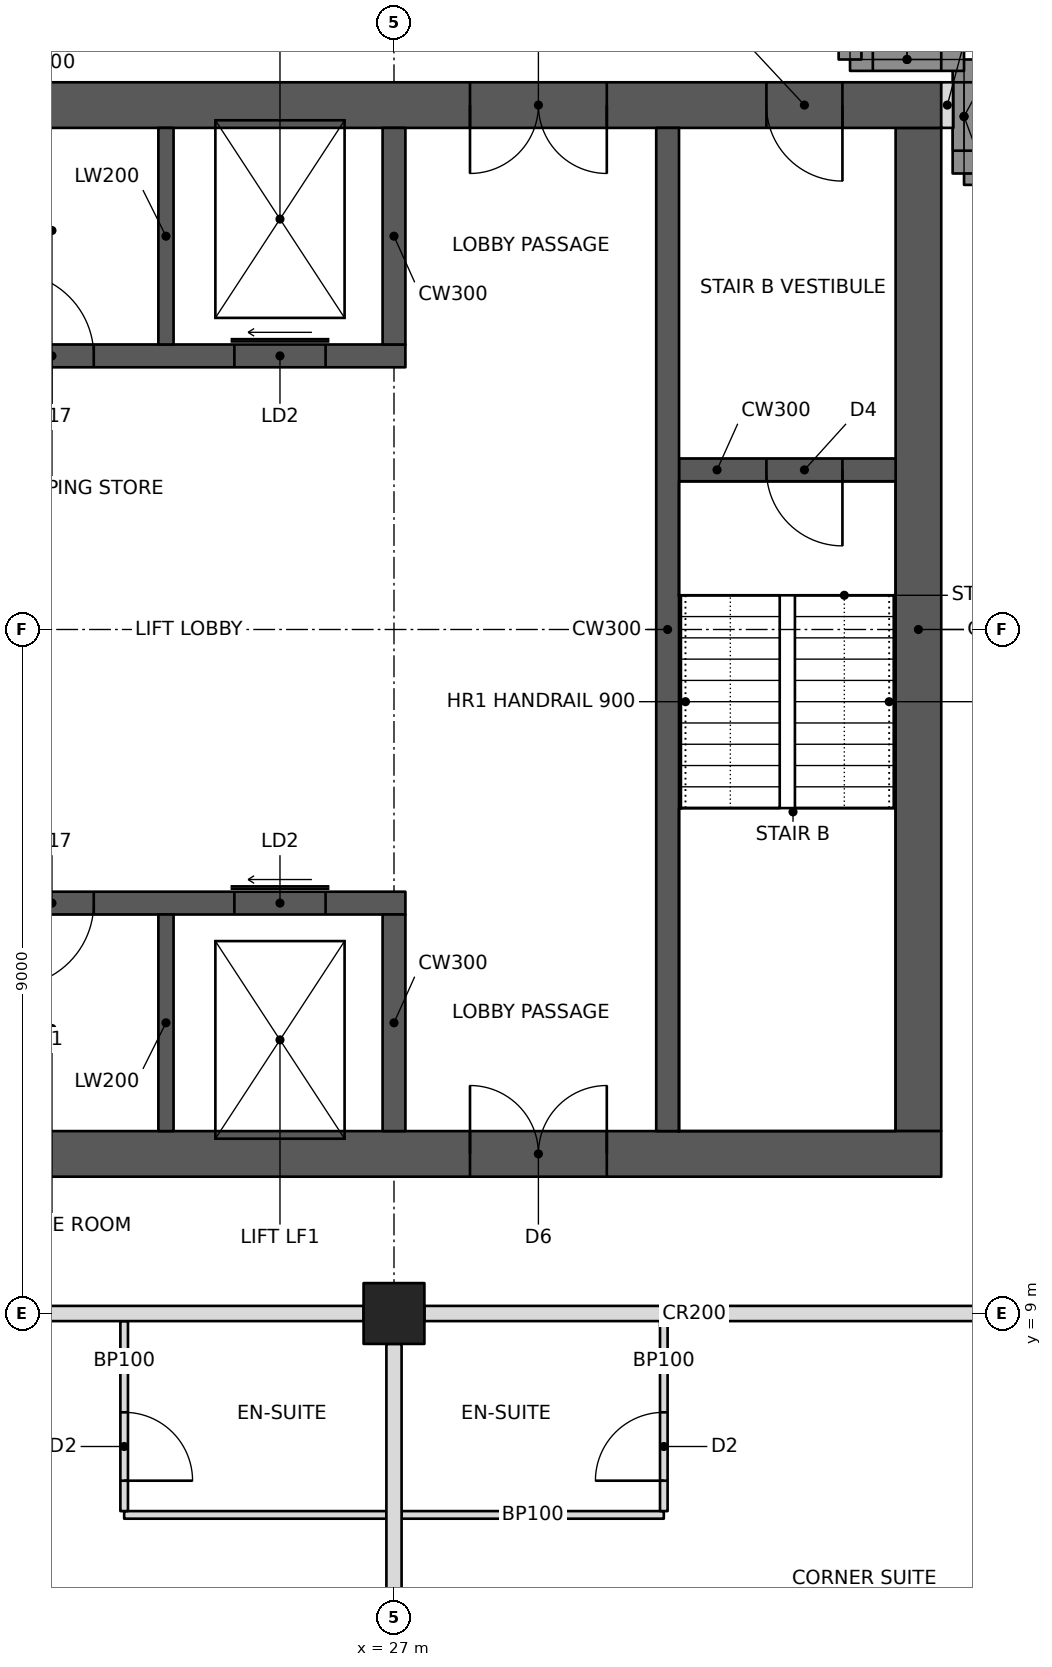
"""IFC4 building model, lengths in metres.
Left out: names, types, materials, properties, quantities, classifications, styles, units other than length and angle.
Written with IfcOpenShell. Run it as: python <this file> out.ifc"""

import sys

from ifc_helpers import new_model, si_unit, direction, frame, frame_2d, origin, origin_2d, place, context, subcontext, project, spatial, rectangle, hollow_rectangle, extrude, element, fill, save


model = new_model("IFC4")
c1 = context("Model", 3, precision=1e-05, world=origin(), true_north=direction((0.0, 1.0)))
c2 = subcontext(c1, "Body", "Model", "MODEL_VIEW")
j1 = project(units=[si_unit("LENGTHUNIT", "METRE"), si_unit("PLANEANGLEUNIT", "RADIAN")], contexts=[c1])
p1 = place(None, origin())
s1 = spatial("IfcSite", under=j1, at=p1, CompositionType="ELEMENT")
p2 = place(p1, origin())
s2 = spatial("IfcBuilding", under=s1, at=p2, CompositionType="ELEMENT")
p3 = place(p2, frame((0.0, 0.0, 244.6)))
s3 = spatial("IfcBuildingStorey", under=s2, at=p3, CompositionType="ELEMENT", Elevation=244.6)
p4 = place(p3, frame((27.0, 9.0, 0.0), z_axis=(0.0, 0.0, 1.0), x_axis=(1.0, 0.0, 0.0)))
e1 = element("IfcColumn", 1, at=p4, inside=s3, PredefinedType="COLUMN", context=c2, shape_type="SweptSolid", body=[
    extrude(hollow_rectangle(XDim=0.8, YDim=0.8, WallThickness=0.04, at=origin_2d()), origin(), (0.0, 0.0, 1.0), 3.6),
])
p5 = place(p3, frame((10.8, 11.1, 0.0), z_axis=(0.0, 0.0, 1.0), x_axis=(1.0, 0.0, 0.0)))
e2 = element("IfcWall", 2, at=p5, inside=s3, PredefinedType="SHEAR", context=c2, shape_type="SweptSolid", body=[
    extrude(rectangle(XDim=23.4, YDim=0.6, at=frame_2d((11.7, 0.0))), origin(), (0.0, 0.0, 1.0), 3.6),
])
p6 = place(p5, frame((1.0, 0.0, 0.0)))
e3 = element("IfcOpeningElement", 3, at=p6, cuts=e2, PredefinedType="OPENING", context=c2, shape_type="SweptSolid", body=[
    extrude(rectangle(XDim=1.0, YDim=2.1, at=frame_2d((0.5, 1.05))), frame((0.0, 0.31, 0.0), z_axis=(0.0, -1.0, 0.0), x_axis=(1.0, 0.0, 0.0)), (0.0, 0.0, 1.0), 0.62),
])
p7 = place(p5, frame((17.2, 0.0, 0.0)))
e4 = element("IfcOpeningElement", 4, at=p7, cuts=e2, PredefinedType="OPENING", context=c2, shape_type="SweptSolid", body=[
    extrude(rectangle(XDim=1.8, YDim=2.1, at=frame_2d((0.9, 1.05))), frame((0.0, 0.31, 0.0), z_axis=(0.0, -1.0, 0.0), x_axis=(1.0, 0.0, 0.0)), (0.0, 0.0, 1.0), 0.62),
])
p8 = place(p3, frame((10.8, 24.9, 0.0), z_axis=(0.0, 0.0, 1.0), x_axis=(1.0, 0.0, 0.0)))
e5 = element("IfcWall", 5, at=p8, inside=s3, PredefinedType="SHEAR", context=c2, shape_type="SweptSolid", body=[
    extrude(rectangle(XDim=23.4, YDim=0.6, at=frame_2d((11.7, 0.0))), origin(), (0.0, 0.0, 1.0), 3.6),
])
p9 = place(p8, frame((17.2, 0.0, 0.0)))
e6 = element("IfcOpeningElement", 6, at=p9, cuts=e5, PredefinedType="OPENING", context=c2, shape_type="SweptSolid", body=[
    extrude(rectangle(XDim=1.8, YDim=2.1, at=frame_2d((0.9, 1.05))), frame((0.0, 0.31, 0.0), z_axis=(0.0, -1.0, 0.0), x_axis=(1.0, 0.0, 0.0)), (0.0, 0.0, 1.0), 0.62),
])
p10 = place(p8, frame((21.1, 0.0, 0.0)))
e7 = element("IfcOpeningElement", 7, at=p10, cuts=e5, PredefinedType="OPENING", context=c2, shape_type="SweptSolid", body=[
    extrude(rectangle(XDim=1.0, YDim=2.1, at=frame_2d((0.5, 1.05))), frame((0.0, 0.31, 0.0), z_axis=(0.0, -1.0, 0.0), x_axis=(1.0, 0.0, 0.0)), (0.0, 0.0, 1.0), 0.62),
])
p11 = place(p8, frame((4.9, 0.0, 0.0)))
e8 = element("IfcOpeningElement", 8, at=p11, cuts=e5, PredefinedType="OPENING", context=c2, shape_type="SweptSolid", body=[
    extrude(rectangle(XDim=1.0, YDim=2.1, at=frame_2d((0.5, 1.05))), frame((0.0, 0.31, 0.0), z_axis=(0.0, -1.0, 0.0), x_axis=(1.0, 0.0, 0.0)), (0.0, 0.0, 1.0), 0.62),
])
p12 = place(p3, frame((33.9, 11.4, 0.0), z_axis=(0.0, 0.0, 1.0), x_axis=(0.0, 1.0, 0.0)))
e9 = element("IfcWall", 9, at=p12, inside=s3, PredefinedType="SHEAR", context=c2, shape_type="SweptSolid", body=[
    extrude(rectangle(XDim=13.2, YDim=0.6, at=frame_2d((6.6, 0.0))), origin(), (0.0, 0.0, 1.0), 3.6),
])
p13 = place(p3, frame((18.15, 14.4, 0.0), z_axis=(0.0, 0.0, 1.0), x_axis=(1.0, 0.0, 0.0)))
e10 = element("IfcWall", 10, at=p13, inside=s3, PredefinedType="SHEAR", context=c2, shape_type="SweptSolid", body=[
    extrude(rectangle(XDim=9.0, YDim=0.3, at=frame_2d((4.5, 0.0))), origin(), (0.0, 0.0, 1.0), 3.6),
])
p14 = place(p13, frame((0.8, 0.0, 0.0)))
e11 = element("IfcOpeningElement", 11, at=p14, cuts=e10, PredefinedType="OPENING", context=c2, shape_type="SweptSolid", body=[
    extrude(rectangle(XDim=1.1, YDim=2.1, at=frame_2d((0.55, 1.05))), frame((0.0, 0.16, 0.0), z_axis=(0.0, -1.0, 0.0), x_axis=(1.0, 0.0, 0.0)), (0.0, 0.0, 1.0), 0.32),
])
p15 = place(p13, frame((6.75, 0.0, 0.0)))
e12 = element("IfcOpeningElement", 12, at=p15, cuts=e10, PredefinedType="OPENING", context=c2, shape_type="SweptSolid", body=[
    extrude(rectangle(XDim=1.2, YDim=2.1, at=frame_2d((0.6, 1.05))), frame((0.0, 0.16, 0.0), z_axis=(0.0, -1.0, 0.0), x_axis=(1.0, 0.0, 0.0)), (0.0, 0.0, 1.0), 0.32),
])
p16 = place(p13, frame((3.8, 0.0, 0.0)))
e13 = element("IfcOpeningElement", 13, at=p16, cuts=e10, PredefinedType="OPENING", context=c2, shape_type="SweptSolid", body=[
    extrude(rectangle(XDim=1.1, YDim=2.1, at=frame_2d((0.55, 1.05))), frame((0.0, 0.16, 0.0), z_axis=(0.0, -1.0, 0.0), x_axis=(1.0, 0.0, 0.0)), (0.0, 0.0, 1.0), 0.32),
])
p17 = place(p3, frame((27.0, 11.4, 0.0), z_axis=(0.0, 0.0, 1.0), x_axis=(0.0, 1.0, 0.0)))
e14 = element("IfcWall", 14, at=p17, inside=s3, PredefinedType="SHEAR", context=c2, shape_type="SweptSolid", body=[
    extrude(rectangle(XDim=2.85, YDim=0.3, at=frame_2d((1.425, 0.0))), origin(), (0.0, 0.0, 1.0), 3.6),
])
p18 = place(p3, frame((24.0, 11.4, 0.0), z_axis=(0.0, 0.0, 1.0), x_axis=(0.0, 1.0, 0.0)))
e15 = element("IfcWall", 15, at=p18, inside=s3, PredefinedType="SHEAR", context=c2, shape_type="SweptSolid", body=[
    extrude(rectangle(XDim=2.85, YDim=0.2, at=frame_2d((1.425, 0.0))), origin(), (0.0, 0.0, 1.0), 3.6),
])
p19 = place(p3, frame((18.15, 21.6, 0.0), z_axis=(0.0, 0.0, 1.0), x_axis=(1.0, 0.0, 0.0)))
e16 = element("IfcWall", 16, at=p19, inside=s3, PredefinedType="SHEAR", context=c2, shape_type="SweptSolid", body=[
    extrude(rectangle(XDim=9.0, YDim=0.3, at=frame_2d((4.5, 0.0))), origin(), (0.0, 0.0, 1.0), 3.6),
])
p20 = place(p19, frame((6.75, 0.0, 0.0)))
e17 = element("IfcOpeningElement", 17, at=p20, cuts=e16, PredefinedType="OPENING", context=c2, shape_type="SweptSolid", body=[
    extrude(rectangle(XDim=1.2, YDim=2.1, at=frame_2d((0.6, 1.05))), frame((0.0, 0.16, 0.0), z_axis=(0.0, -1.0, 0.0), x_axis=(1.0, 0.0, 0.0)), (0.0, 0.0, 1.0), 0.32),
])
p21 = place(p19, frame((0.8, 0.0, 0.0)))
e18 = element("IfcOpeningElement", 18, at=p21, cuts=e16, PredefinedType="OPENING", context=c2, shape_type="SweptSolid", body=[
    extrude(rectangle(XDim=1.1, YDim=2.1, at=frame_2d((0.55, 1.05))), frame((0.0, 0.16, 0.0), z_axis=(0.0, -1.0, 0.0), x_axis=(1.0, 0.0, 0.0)), (0.0, 0.0, 1.0), 0.32),
])
p22 = place(p19, frame((3.8, 0.0, 0.0)))
e19 = element("IfcOpeningElement", 19, at=p22, cuts=e16, PredefinedType="OPENING", context=c2, shape_type="SweptSolid", body=[
    extrude(rectangle(XDim=1.1, YDim=2.1, at=frame_2d((0.55, 1.05))), frame((0.0, 0.16, 0.0), z_axis=(0.0, -1.0, 0.0), x_axis=(1.0, 0.0, 0.0)), (0.0, 0.0, 1.0), 0.32),
])
p23 = place(p3, frame((27.0, 21.75, 0.0), z_axis=(0.0, 0.0, 1.0), x_axis=(0.0, 1.0, 0.0)))
e20 = element("IfcWall", 20, at=p23, inside=s3, PredefinedType="SHEAR", context=c2, shape_type="SweptSolid", body=[
    extrude(rectangle(XDim=2.85, YDim=0.3, at=frame_2d((1.425, 0.0))), origin(), (0.0, 0.0, 1.0), 3.6),
])
p24 = place(p3, frame((24.0, 21.75, 0.0), z_axis=(0.0, 0.0, 1.0), x_axis=(0.0, 1.0, 0.0)))
e21 = element("IfcWall", 21, at=p24, inside=s3, PredefinedType="SHEAR", context=c2, shape_type="SweptSolid", body=[
    extrude(rectangle(XDim=2.85, YDim=0.2, at=frame_2d((1.425, 0.0))), origin(), (0.0, 0.0, 1.0), 3.6),
])
p25 = place(p3, frame((30.6, 11.4, 0.0), z_axis=(0.0, 0.0, 1.0), x_axis=(0.0, 1.0, 0.0)))
e22 = element("IfcWall", 22, at=p25, inside=s3, PredefinedType="SHEAR", context=c2, shape_type="SweptSolid", body=[
    extrude(rectangle(XDim=13.2, YDim=0.3, at=frame_2d((6.6, 0.0))), origin(), (0.0, 0.0, 1.0), 3.6),
])
p26 = place(p3, frame((30.75, 20.1, 0.0), z_axis=(0.0, 0.0, 1.0), x_axis=(1.0, 0.0, 0.0)))
e23 = element("IfcWall", 23, at=p26, inside=s3, PredefinedType="SHEAR", context=c2, shape_type="SweptSolid", body=[
    extrude(rectangle(XDim=2.85, YDim=0.3, at=frame_2d((1.425, 0.0))), origin(), (0.0, 0.0, 1.0), 3.6),
])
p27 = place(p26, frame((1.15, 0.0, 0.0)))
e24 = element("IfcOpeningElement", 24, at=p27, cuts=e23, PredefinedType="OPENING", context=c2, shape_type="SweptSolid", body=[
    extrude(rectangle(XDim=1.0, YDim=2.1, at=frame_2d((0.5, 1.05))), frame((0.0, 0.16, 0.0), z_axis=(0.0, -1.0, 0.0), x_axis=(1.0, 0.0, 0.0)), (0.0, 0.0, 1.0), 0.32),
])
p28 = place(p3, frame((36.0, 24.0, 0.0), z_axis=(0.0, 0.0, 1.0), x_axis=(-1.0, 0.0, 0.0)))
e25 = element("IfcWall", 25, at=p28, inside=s3, PredefinedType="SOLIDWALL", context=c2, shape_type="SweptSolid", body=[
    extrude(rectangle(XDim=1.5, YDim=0.3, at=frame_2d((0.75, 0.0))), origin(), (0.0, 0.0, 1.0), 2.62),
])
p29 = place(p3, frame((34.5, 24.0, 0.0), z_axis=(0.0, 0.0, 1.0), x_axis=(0.0, 1.0, 0.0)))
e26 = element("IfcWall", 26, at=p29, inside=s3, PredefinedType="SOLIDWALL", context=c2, shape_type="SweptSolid", body=[
    extrude(rectangle(XDim=1.5, YDim=0.3, at=frame_2d((0.75, 0.0))), origin(), (0.0, 0.0, 1.0), 3.4),
])
p30 = place(p29, frame((0.3, 0.0, 0.6)))
e27 = element("IfcOpeningElement", 27, at=p30, cuts=e26, PredefinedType="OPENING", context=c2, shape_type="SweptSolid", body=[
    extrude(rectangle(XDim=0.9, YDim=2.2, at=frame_2d((0.45, 1.1))), frame((0.0, 0.16, 0.0), z_axis=(0.0, -1.0, 0.0), x_axis=(1.0, 0.0, 0.0)), (0.0, 0.0, 1.0), 0.32),
])
p31 = place(p3, frame((34.5, 25.5, 0.0), z_axis=(0.0, 0.0, 1.0), x_axis=(-1.0, 0.0, 0.0)))
e28 = element("IfcWall", 28, at=p31, inside=s3, PredefinedType="SOLIDWALL", context=c2, shape_type="SweptSolid", body=[
    extrude(rectangle(XDim=1.5, YDim=0.3, at=frame_2d((0.75, 0.0))), origin(), (0.0, 0.0, 1.0), 3.4),
])
p32 = place(p31, frame((0.3, 0.0, 0.6)))
e29 = element("IfcOpeningElement", 29, at=p32, cuts=e28, PredefinedType="OPENING", context=c2, shape_type="SweptSolid", body=[
    extrude(rectangle(XDim=0.9, YDim=2.2, at=frame_2d((0.45, 1.1))), frame((0.0, 0.16, 0.0), z_axis=(0.0, -1.0, 0.0), x_axis=(1.0, 0.0, 0.0)), (0.0, 0.0, 1.0), 0.32),
])
p33 = place(p3, frame((33.0, 25.5, 0.0), z_axis=(0.0, 0.0, 1.0), x_axis=(0.0, 1.0, 0.0)))
e30 = element("IfcWall", 30, at=p33, inside=s3, PredefinedType="SOLIDWALL", context=c2, shape_type="SweptSolid", body=[
    extrude(rectangle(XDim=1.5, YDim=0.3, at=frame_2d((0.75, 0.0))), origin(), (0.0, 0.0, 1.0), 2.62),
])
p34 = place(p3, frame((18.4, 9.0, 0.0), z_axis=(0.0, 0.0, 1.0), x_axis=(1.0, 0.0, 0.0)))
e31 = element("IfcWall", 31, at=p34, inside=s3, PredefinedType="PARTITIONING", context=c2, shape_type="SweptSolid", body=[
    extrude(rectangle(XDim=8.2, YDim=0.2, at=frame_2d((4.1, 0.0))), origin(), (0.0, 0.0, 1.0), 2.605),
])
p35 = place(p34, frame((0.15, 0.0, 0.0)))
e32 = element("IfcOpeningElement", 32, at=p35, cuts=e31, PredefinedType="OPENING", context=c2, shape_type="SweptSolid", body=[
    extrude(rectangle(XDim=0.9, YDim=2.1, at=frame_2d((0.45, 1.05))), frame((0.0, 0.11, 0.0), z_axis=(0.0, -1.0, 0.0), x_axis=(1.0, 0.0, 0.0)), (0.0, 0.0, 1.0), 0.22),
])
p36 = place(p3, frame((27.4, 9.0, 0.0), z_axis=(0.0, 0.0, 1.0), x_axis=(1.0, 0.0, 0.0)))
e33 = element("IfcWall", 33, at=p36, inside=s3, PredefinedType="PARTITIONING", context=c2, shape_type="SweptSolid", body=[
    extrude(rectangle(XDim=8.368, YDim=0.2, at=frame_2d((4.184, 0.0))), origin(), (0.0, 0.0, 1.0), 2.605),
])
p37 = place(p36, frame((7.25, 0.0, 0.0)))
e34 = element("IfcOpeningElement", 34, at=p37, cuts=e33, PredefinedType="OPENING", context=c2, shape_type="SweptSolid", body=[
    extrude(rectangle(XDim=0.9, YDim=2.1, at=frame_2d((0.45, 1.05))), frame((0.0, 0.11, 0.0), z_axis=(0.0, -1.0, 0.0), x_axis=(1.0, 0.0, 0.0)), (0.0, 0.0, 1.0), 0.22),
])
p38 = place(p3, frame((27.0, 8.6, 0.0), z_axis=(0.0, 0.0, 1.0), x_axis=(0.0, -1.0, 0.0)))
e35 = element("IfcWall", 35, at=p38, inside=s3, PredefinedType="PARTITIONING", context=c2, shape_type="SweptSolid", body=[
    extrude(rectangle(XDim=7.6, YDim=0.2, at=frame_2d((3.8, 0.0))), origin(), (0.0, 0.0, 1.0), 2.605),
])
p39 = place(p3, frame((23.45, 6.35, 0.0), z_axis=(0.0, 0.0, 1.0), x_axis=(1.0, 0.0, 0.0)))
e36 = element("IfcWall", 36, at=p39, inside=s3, PredefinedType="PARTITIONING", context=c2, shape_type="SweptSolid", body=[
    extrude(rectangle(XDim=3.45, YDim=0.1, at=frame_2d((1.725, 0.0))), origin(), (0.0, 0.0, 1.0), 2.604),
])
p40 = place(p3, frame((23.45, 8.9, 0.0), z_axis=(0.0, 0.0, 1.0), x_axis=(0.0, -1.0, 0.0)))
e37 = element("IfcWall", 37, at=p40, inside=s3, PredefinedType="PARTITIONING", context=c2, shape_type="SweptSolid", body=[
    extrude(rectangle(XDim=2.5, YDim=0.1, at=frame_2d((1.25, 0.0))), origin(), (0.0, 0.0, 1.0), 2.604),
])
p41 = place(p40, frame((1.2, 0.0, 0.0)))
e38 = element("IfcOpeningElement", 38, at=p41, cuts=e37, PredefinedType="OPENING", context=c2, shape_type="SweptSolid", body=[
    extrude(rectangle(XDim=0.9, YDim=2.1, at=frame_2d((0.45, 1.05))), frame((0.0, 0.06, 0.0), z_axis=(0.0, -1.0, 0.0), x_axis=(1.0, 0.0, 0.0)), (0.0, 0.0, 1.0), 0.12),
])
p42 = place(p3, frame((27.1, 6.35, 0.0), z_axis=(0.0, 0.0, 1.0), x_axis=(1.0, 0.0, 0.0)))
e39 = element("IfcWall", 39, at=p42, inside=s3, PredefinedType="PARTITIONING", context=c2, shape_type="SweptSolid", body=[
    extrude(rectangle(XDim=3.45, YDim=0.1, at=frame_2d((1.725, 0.0))), origin(), (0.0, 0.0, 1.0), 2.604),
])
p43 = place(p3, frame((30.55, 8.9, 0.0), z_axis=(0.0, 0.0, 1.0), x_axis=(0.0, -1.0, 0.0)))
e40 = element("IfcWall", 40, at=p43, inside=s3, PredefinedType="PARTITIONING", context=c2, shape_type="SweptSolid", body=[
    extrude(rectangle(XDim=2.5, YDim=0.1, at=frame_2d((1.25, 0.0))), origin(), (0.0, 0.0, 1.0), 2.604),
])
p44 = place(p43, frame((1.2, 0.0, 0.0)))
e41 = element("IfcOpeningElement", 41, at=p44, cuts=e40, PredefinedType="OPENING", context=c2, shape_type="SweptSolid", body=[
    extrude(rectangle(XDim=0.9, YDim=2.1, at=frame_2d((0.45, 1.05))), frame((0.0, 0.06, 0.0), z_axis=(0.0, -1.0, 0.0), x_axis=(1.0, 0.0, 0.0)), (0.0, 0.0, 1.0), 0.12),
])
p45 = place(p3, frame((34.2, 24.9, 0.0), z_axis=(0.0, 0.0, 1.0), x_axis=(1.0, 0.0, 0.0)))
e42 = element("IfcWall", 42, at=p45, inside=s3, PredefinedType="PARTITIONING", context=c2, shape_type="SweptSolid", body=[
    extrude(rectangle(XDim=0.16, YDim=0.6, at=frame_2d((0.08, 0.0))), origin(), (0.0, 0.0, 1.0), 3.4),
])
p46 = place(p30, origin())
e43 = element("IfcWindow", 43, at=p46, inside=s3, PartitioningType="SINGLE_PANEL", PredefinedType="WINDOW", context=c2, shape_type="SweptSolid", body=[
    extrude(rectangle(XDim=0.9, YDim=2.2, at=frame_2d((0.45, 1.1))), frame((0.0, 0.03, 0.0), z_axis=(0.0, -1.0, 0.0), x_axis=(1.0, 0.0, 0.0)), (0.0, 0.0, 1.0), 0.06),
])
fill(e27, e43)
p47 = place(p32, origin())
e44 = element("IfcWindow", 44, at=p47, inside=s3, PartitioningType="SINGLE_PANEL", PredefinedType="WINDOW", context=c2, shape_type="SweptSolid", body=[
    extrude(rectangle(XDim=0.9, YDim=2.2, at=frame_2d((0.45, 1.1))), frame((0.0, 0.03, 0.0), z_axis=(0.0, -1.0, 0.0), x_axis=(1.0, 0.0, 0.0)), (0.0, 0.0, 1.0), 0.06),
])
fill(e29, e44)
p48 = place(p41, origin())
e45 = element("IfcDoor", 45, at=p48, inside=s3, OperationType="SINGLE_SWING_RIGHT", PredefinedType="DOOR", context=c2, shape_type="SweptSolid", body=[
    extrude(rectangle(XDim=0.9, YDim=2.1, at=frame_2d((0.45, 1.05))), frame((0.0, 0.025, 0.0), z_axis=(0.0, -1.0, 0.0), x_axis=(1.0, 0.0, 0.0)), (0.0, 0.0, 1.0), 0.05),
])
fill(e38, e45)
p49 = place(p44, frame((0.9, 0.0, 0.0), z_axis=(0.0, 0.0, 1.0), x_axis=(-1.0, 0.0, 0.0)))
e46 = element("IfcDoor", 46, at=p49, inside=s3, OperationType="SINGLE_SWING_LEFT", PredefinedType="DOOR", context=c2, shape_type="SweptSolid", body=[
    extrude(rectangle(XDim=0.9, YDim=2.1, at=frame_2d((0.45, 1.05))), frame((0.0, 0.025, 0.0), z_axis=(0.0, -1.0, 0.0), x_axis=(1.0, 0.0, 0.0)), (0.0, 0.0, 1.0), 0.05),
])
fill(e41, e46)
p50 = place(p7, origin())
e47 = element("IfcDoor", 47, at=p50, inside=s3, OperationType="DOUBLE_DOOR_SINGLE_SWING", PredefinedType="DOOR", context=c2, shape_type="SweptSolid", body=[
    extrude(rectangle(XDim=1.8, YDim=2.1, at=frame_2d((0.9, 1.05))), frame((0.0, 0.025, 0.0), z_axis=(0.0, -1.0, 0.0), x_axis=(1.0, 0.0, 0.0)), (0.0, 0.0, 1.0), 0.05),
])
fill(e4, e47)
p51 = place(p9, frame((1.8, 0.0, 0.0), z_axis=(0.0, 0.0, 1.0), x_axis=(-1.0, 0.0, 0.0)))
e48 = element("IfcDoor", 48, at=p51, inside=s3, OperationType="DOUBLE_DOOR_SINGLE_SWING", PredefinedType="DOOR", context=c2, shape_type="SweptSolid", body=[
    extrude(rectangle(XDim=1.8, YDim=2.1, at=frame_2d((0.9, 1.05))), frame((0.0, 0.025, 0.0), z_axis=(0.0, -1.0, 0.0), x_axis=(1.0, 0.0, 0.0)), (0.0, 0.0, 1.0), 0.05),
])
fill(e6, e48)
p52 = place(p10, frame((1.0, 0.0, 0.0), z_axis=(0.0, 0.0, 1.0), x_axis=(-1.0, 0.0, 0.0)))
e49 = element("IfcDoor", 49, at=p52, inside=s3, OperationType="SINGLE_SWING_LEFT", PredefinedType="DOOR", context=c2, shape_type="SweptSolid", body=[
    extrude(rectangle(XDim=1.0, YDim=2.1, at=frame_2d((0.5, 1.05))), frame((0.0, 0.025, 0.0), z_axis=(0.0, -1.0, 0.0), x_axis=(1.0, 0.0, 0.0)), (0.0, 0.0, 1.0), 0.05),
])
fill(e7, e49)
p53 = place(p27, frame((1.0, 0.0, 0.0), z_axis=(0.0, 0.0, 1.0), x_axis=(-1.0, 0.0, 0.0)))
e50 = element("IfcDoor", 50, at=p53, inside=s3, OperationType="SINGLE_SWING_LEFT", PredefinedType="DOOR", context=c2, shape_type="SweptSolid", body=[
    extrude(rectangle(XDim=1.0, YDim=2.1, at=frame_2d((0.5, 1.05))), frame((0.0, 0.025, 0.0), z_axis=(0.0, -1.0, 0.0), x_axis=(1.0, 0.0, 0.0)), (0.0, 0.0, 1.0), 0.05),
])
fill(e24, e50)
p54 = place(p15, origin())
e51 = element("IfcDoor", 51, at=p54, inside=s3, OperationType="SLIDING_TO_LEFT", PredefinedType="DOOR", context=c2, shape_type="SweptSolid", body=[
    extrude(rectangle(XDim=1.2, YDim=2.1, at=frame_2d((0.6, 1.05))), frame((0.0, 0.025, 0.0), z_axis=(0.0, -1.0, 0.0), x_axis=(1.0, 0.0, 0.0)), (0.0, 0.0, 1.0), 0.05),
])
fill(e12, e51)
p55 = place(p20, origin())
e52 = element("IfcDoor", 52, at=p55, inside=s3, OperationType="SLIDING_TO_LEFT", PredefinedType="DOOR", context=c2, shape_type="SweptSolid", body=[
    extrude(rectangle(XDim=1.2, YDim=2.1, at=frame_2d((0.6, 1.05))), frame((0.0, 0.025, 0.0), z_axis=(0.0, -1.0, 0.0), x_axis=(1.0, 0.0, 0.0)), (0.0, 0.0, 1.0), 0.05),
])
fill(e17, e52)
p56 = place(p22, origin())
e53 = element("IfcDoor", 53, at=p56, inside=s3, OperationType="SINGLE_SWING_LEFT", PredefinedType="DOOR", context=c2, shape_type="SweptSolid", body=[
    extrude(rectangle(XDim=1.1, YDim=2.1, at=frame_2d((0.55, 1.05))), frame((0.0, 0.025, 0.0), z_axis=(0.0, -1.0, 0.0), x_axis=(1.0, 0.0, 0.0)), (0.0, 0.0, 1.0), 0.05),
])
fill(e19, e53)
p57 = place(p16, frame((1.1, 0.0, 0.0), z_axis=(0.0, 0.0, 1.0), x_axis=(-1.0, 0.0, 0.0)))
e54 = element("IfcDoor", 54, at=p57, inside=s3, OperationType="SINGLE_SWING_RIGHT", PredefinedType="DOOR", context=c2, shape_type="SweptSolid", body=[
    extrude(rectangle(XDim=1.1, YDim=2.1, at=frame_2d((0.55, 1.05))), frame((0.0, 0.025, 0.0), z_axis=(0.0, -1.0, 0.0), x_axis=(1.0, 0.0, 0.0)), (0.0, 0.0, 1.0), 0.05),
])
fill(e13, e54)
save(model, sys.argv[1])
